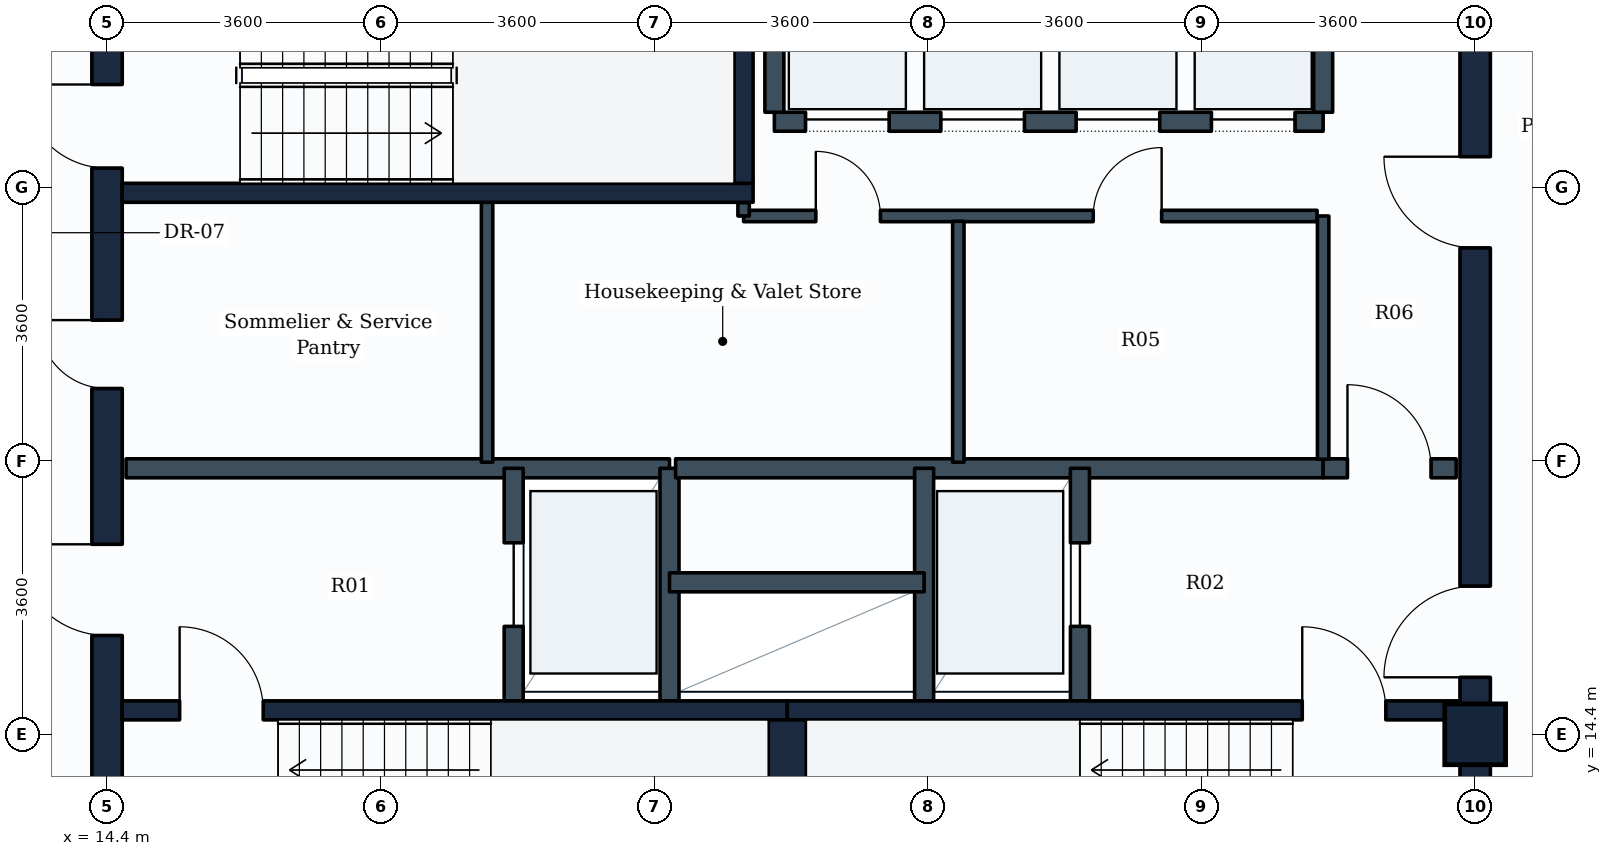
"""IFC4 building model, lengths in metres.
Left out: names, types, materials, properties, quantities, classifications, styles, units other than length and angle.
Written with IfcOpenShell. Run it as: python <this file> out.ifc"""

import sys

from ifc_helpers import new_model, si_unit, direction, frame, frame_2d, origin, origin_2d, place, context, subcontext, project, spatial, rectangle, extrude, element, fill, save


model = new_model("IFC4")
c1 = context("Model", 3, precision=1e-05, world=origin(), true_north=direction((0.0, 1.0)))
c2 = subcontext(c1, "Body", "Model", "MODEL_VIEW")
j1 = project(units=[si_unit("LENGTHUNIT", "METRE"), si_unit("PLANEANGLEUNIT", "RADIAN")], contexts=[c1])
p1 = place(None, origin())
s1 = spatial("IfcSite", under=j1, at=p1, CompositionType="ELEMENT")
p2 = place(p1, origin())
s2 = spatial("IfcBuilding", under=s1, at=p2, CompositionType="ELEMENT")
p3 = place(p2, frame((0.0, 0.0, 242.6)))
s3 = spatial("IfcBuildingStorey", under=s2, at=p3, CompositionType="ELEMENT", Elevation=242.6)
p4 = place(p3, frame((32.4, 14.4, 0.0), z_axis=(0.0, 0.0, 1.0), x_axis=(1.0, 0.0, 0.0)))
e1 = element("IfcColumn", 1, at=p4, inside=s3, PredefinedType="COLUMN", context=c2, shape_type="SweptSolid", body=[
    extrude(rectangle(XDim=0.8, YDim=0.8, at=origin_2d()), origin(), (0.0, 0.0, 1.0), 3.6),
])
p5 = place(p3, frame((14.4, 10.8, 0.0), z_axis=(0.0, 0.0, 1.0), x_axis=(0.0, 1.0, 0.0)))
e2 = element("IfcWall", 2, at=p5, inside=s3, PredefinedType="SHEAR", context=c2, shape_type="SweptSolid", body=[
    extrude(rectangle(XDim=14.4, YDim=0.4, at=frame_2d((7.2, 0.0))), origin(), (0.0, 0.0, 1.0), 3.35),
])
p6 = place(p5, frame((11.05, 0.0, 0.0)))
e3 = element("IfcOpeningElement", 3, at=p6, cuts=e2, PredefinedType="OPENING", context=c2, shape_type="SweptSolid", body=[
    extrude(rectangle(XDim=1.1, YDim=2.1, at=frame_2d((0.55, 1.05))), frame((0.0, 0.21, 0.0), z_axis=(0.0, -1.0, 0.0), x_axis=(1.0, 0.0, 0.0)), (0.0, 0.0, 1.0), 0.42),
])
p7 = place(p5, frame((4.9, 0.0, 0.0)))
e4 = element("IfcOpeningElement", 4, at=p7, cuts=e2, PredefinedType="OPENING", context=c2, shape_type="SweptSolid", body=[
    extrude(rectangle(XDim=1.2, YDim=2.1, at=frame_2d((0.6, 1.05))), frame((0.0, 0.21, 0.0), z_axis=(0.0, -1.0, 0.0), x_axis=(1.0, 0.0, 0.0)), (0.0, 0.0, 1.0), 0.42),
])
p8 = place(p5, frame((8.15, 0.0, 0.0)))
e5 = element("IfcOpeningElement", 5, at=p8, cuts=e2, PredefinedType="OPENING", context=c2, shape_type="SweptSolid", body=[
    extrude(rectangle(XDim=0.9, YDim=2.1, at=frame_2d((0.45, 1.05))), frame((0.0, 0.21, 0.0), z_axis=(0.0, -1.0, 0.0), x_axis=(1.0, 0.0, 0.0)), (0.0, 0.0, 1.0), 0.42),
])
p9 = place(p3, frame((32.4, 10.8, 0.0), z_axis=(0.0, 0.0, 1.0), x_axis=(0.0, 1.0, 0.0)))
e6 = element("IfcWall", 6, at=p9, inside=s3, PredefinedType="SHEAR", context=c2, shape_type="SweptSolid", body=[
    extrude(rectangle(XDim=14.4, YDim=0.4, at=frame_2d((7.2, 0.0))), origin(), (0.0, 0.0, 1.0), 3.35),
])
p10 = place(p9, frame((4.35, 0.0, 0.0)))
e7 = element("IfcOpeningElement", 7, at=p10, cuts=e6, PredefinedType="OPENING", context=c2, shape_type="SweptSolid", body=[
    extrude(rectangle(XDim=1.2, YDim=2.1, at=frame_2d((0.6, 1.05))), frame((0.0, 0.21, 0.0), z_axis=(0.0, -1.0, 0.0), x_axis=(1.0, 0.0, 0.0)), (0.0, 0.0, 1.0), 0.42),
])
p11 = place(p9, frame((10.0, 0.0, 0.0)))
e8 = element("IfcOpeningElement", 8, at=p11, cuts=e6, PredefinedType="OPENING", context=c2, shape_type="SweptSolid", body=[
    extrude(rectangle(XDim=1.2, YDim=2.1, at=frame_2d((0.6, 1.05))), frame((0.0, 0.21, 0.0), z_axis=(0.0, -1.0, 0.0), x_axis=(1.0, 0.0, 0.0)), (0.0, 0.0, 1.0), 0.42),
])
p12 = place(p3, frame((14.6, 14.715, 0.0), z_axis=(0.0, 0.0, 1.0), x_axis=(1.0, 0.0, 0.0)))
e9 = element("IfcWall", 9, at=p12, inside=s3, PredefinedType="SHEAR", context=c2, shape_type="SweptSolid", body=[
    extrude(rectangle(XDim=8.75, YDim=0.25, at=frame_2d((4.375, 0.0))), origin(), (0.0, 0.0, 1.0), 3.35),
])
p13 = place(p12, frame((0.755, 0.0, 0.0)))
e10 = element("IfcOpeningElement", 10, at=p13, cuts=e9, PredefinedType="OPENING", context=c2, shape_type="SweptSolid", body=[
    extrude(rectangle(XDim=1.1, YDim=2.1, at=frame_2d((0.55, 1.05))), frame((0.0, 0.135, 0.0), z_axis=(0.0, -1.0, 0.0), x_axis=(1.0, 0.0, 0.0)), (0.0, 0.0, 1.0), 0.27),
])
p14 = place(p3, frame((23.35, 14.715, 0.0), z_axis=(0.0, 0.0, 1.0), x_axis=(1.0, 0.0, 0.0)))
e11 = element("IfcWall", 11, at=p14, inside=s3, PredefinedType="SHEAR", context=c2, shape_type="SweptSolid", body=[
    extrude(rectangle(XDim=8.85, YDim=0.25, at=frame_2d((4.425, 0.0))), origin(), (0.0, 0.0, 1.0), 3.35),
])
p15 = place(p14, frame((6.775, 0.0, 0.0)))
e12 = element("IfcOpeningElement", 12, at=p15, cuts=e11, PredefinedType="OPENING", context=c2, shape_type="SweptSolid", body=[
    extrude(rectangle(XDim=1.1, YDim=2.1, at=frame_2d((0.55, 1.05))), frame((0.0, 0.135, 0.0), z_axis=(0.0, -1.0, 0.0), x_axis=(1.0, 0.0, 0.0)), (0.0, 0.0, 1.0), 0.27),
])
p16 = place(p3, frame((23.35, 11.75, 0.0), z_axis=(0.0, 0.0, 1.0), x_axis=(0.0, 1.0, 0.0)))
e13 = element("IfcWall", 13, at=p16, inside=s3, PredefinedType="SHEAR", context=c2, shape_type="SweptSolid", body=[
    extrude(rectangle(XDim=2.84, YDim=0.5, at=frame_2d((1.42, 0.0))), origin(), (0.0, 0.0, 1.0), 3.35),
])
p17 = place(p3, frame((14.6, 21.525, 0.0), z_axis=(0.0, 0.0, 1.0), x_axis=(1.0, 0.0, 0.0)))
e14 = element("IfcWall", 14, at=p17, inside=s3, PredefinedType="SHEAR", context=c2, shape_type="SweptSolid", body=[
    extrude(rectangle(XDim=8.3, YDim=0.25, at=frame_2d((4.15, 0.0))), origin(), (0.0, 0.0, 1.0), 3.35),
])
p18 = place(p3, frame((22.775, 21.65, 0.0), z_axis=(0.0, 0.0, 1.0), x_axis=(0.0, 1.0, 0.0)))
e15 = element("IfcWall", 15, at=p18, inside=s3, PredefinedType="SHEAR", context=c2, shape_type="SweptSolid", body=[
    extrude(rectangle(XDim=2.84, YDim=0.25, at=frame_2d((1.42, 0.0))), origin(), (0.0, 0.0, 1.0), 3.35),
])
p19 = place(p3, frame((14.65, 17.9, 0.0), z_axis=(0.0, 0.0, 1.0), x_axis=(1.0, 0.0, 0.0)))
e16 = element("IfcWall", 16, at=p19, inside=s3, PredefinedType="PARTITIONING", context=c2, shape_type="SweptSolid", body=[
    extrude(rectangle(XDim=7.15, YDim=0.25, at=frame_2d((3.575, 0.0))), origin(), (0.0, 0.0, 1.0), 3.335),
])
p20 = place(p3, frame((19.75, 14.84, 0.0), z_axis=(0.0, 0.0, 1.0), x_axis=(0.0, 1.0, 0.0)))
e17 = element("IfcWall", 17, at=p20, inside=s3, PredefinedType="PARTITIONING", context=c2, shape_type="SweptSolid", body=[
    extrude(rectangle(XDim=3.06, YDim=0.25, at=frame_2d((1.53, 0.0))), origin(), (0.0, 0.0, 1.0), 3.335),
])
p21 = place(p20, frame((0.98, 0.0, 0.0)))
e18 = element("IfcOpeningElement", 18, at=p21, cuts=e17, PredefinedType="OPENING", context=c2, shape_type="SweptSolid", body=[
    extrude(rectangle(XDim=1.1, YDim=2.1, at=frame_2d((0.55, 1.05))), frame((0.0, 0.135, 0.0), z_axis=(0.0, -1.0, 0.0), x_axis=(1.0, 0.0, 0.0)), (0.0, 0.0, 1.0), 0.27),
])
p22 = place(p3, frame((21.8, 14.84, 0.0), z_axis=(0.0, 0.0, 1.0), x_axis=(0.0, 1.0, 0.0)))
e19 = element("IfcWall", 19, at=p22, inside=s3, PredefinedType="PARTITIONING", context=c2, shape_type="SweptSolid", body=[
    extrude(rectangle(XDim=3.06, YDim=0.25, at=frame_2d((1.53, 0.0))), origin(), (0.0, 0.0, 1.0), 3.335),
])
p23 = place(p3, frame((21.88, 17.9, 0.0), z_axis=(0.0, 0.0, 1.0), x_axis=(1.0, 0.0, 0.0)))
e20 = element("IfcWall", 20, at=p23, inside=s3, PredefinedType="PARTITIONING", context=c2, shape_type="SweptSolid", body=[
    extrude(rectangle(XDim=8.52, YDim=0.25, at=frame_2d((4.26, 0.0))), origin(), (0.0, 0.0, 1.0), 3.335),
])
p24 = place(p3, frame((30.4, 17.9, 0.0), z_axis=(0.0, 0.0, 1.0), x_axis=(1.0, 0.0, 0.0)))
e21 = element("IfcWall", 21, at=p24, inside=s3, PredefinedType="PARTITIONING", context=c2, shape_type="SweptSolid", body=[
    extrude(rectangle(XDim=1.75, YDim=0.25, at=frame_2d((0.875, 0.0))), origin(), (0.0, 0.0, 1.0), 3.335),
])
p25 = place(p24, frame((0.32, 0.0, 0.0)))
e22 = element("IfcOpeningElement", 22, at=p25, cuts=e21, PredefinedType="OPENING", context=c2, shape_type="SweptSolid", body=[
    extrude(rectangle(XDim=1.1, YDim=2.1, at=frame_2d((0.55, 1.05))), frame((0.0, 0.135, 0.0), z_axis=(0.0, -1.0, 0.0), x_axis=(1.0, 0.0, 0.0)), (0.0, 0.0, 1.0), 0.27),
])
p26 = place(p3, frame((25.15, 14.84, 0.0), z_axis=(0.0, 0.0, 1.0), x_axis=(0.0, 1.0, 0.0)))
e23 = element("IfcWall", 23, at=p26, inside=s3, PredefinedType="PARTITIONING", context=c2, shape_type="SweptSolid", body=[
    extrude(rectangle(XDim=3.06, YDim=0.25, at=frame_2d((1.53, 0.0))), origin(), (0.0, 0.0, 1.0), 3.335),
])
p27 = place(p3, frame((27.2, 14.84, 0.0), z_axis=(0.0, 0.0, 1.0), x_axis=(0.0, 1.0, 0.0)))
e24 = element("IfcWall", 24, at=p27, inside=s3, PredefinedType="PARTITIONING", context=c2, shape_type="SweptSolid", body=[
    extrude(rectangle(XDim=3.06, YDim=0.25, at=frame_2d((1.53, 0.0))), origin(), (0.0, 0.0, 1.0), 3.335),
])
p28 = place(p27, frame((0.98, 0.0, 0.0)))
e25 = element("IfcOpeningElement", 25, at=p28, cuts=e24, PredefinedType="OPENING", context=c2, shape_type="SweptSolid", body=[
    extrude(rectangle(XDim=1.1, YDim=2.1, at=frame_2d((0.55, 1.05))), frame((0.0, 0.135, 0.0), z_axis=(0.0, -1.0, 0.0), x_axis=(1.0, 0.0, 0.0)), (0.0, 0.0, 1.0), 0.27),
])
p29 = place(p3, frame((21.8, 16.4, 0.0), z_axis=(0.0, 0.0, 1.0), x_axis=(1.0, 0.0, 0.0)))
e26 = element("IfcWall", 26, at=p29, inside=s3, PredefinedType="PARTITIONING", context=c2, shape_type="SweptSolid", body=[
    extrude(rectangle(XDim=3.35, YDim=0.25, at=frame_2d((1.675, 0.0))), origin(), (0.0, 0.0, 1.0), 3.335),
])
p30 = place(p3, frame((23.18, 22.46, 0.0), z_axis=(0.0, 0.0, 1.0), x_axis=(1.0, 0.0, 0.0)))
e27 = element("IfcWall", 27, at=p30, inside=s3, PredefinedType="PARTITIONING", context=c2, shape_type="SweptSolid", body=[
    extrude(rectangle(XDim=7.22, YDim=0.25, at=frame_2d((3.61, 0.0))), origin(), (0.0, 0.0, 1.0), 3.335),
])
p31 = place(p30, frame((0.41, 0.0, 0.0)))
e28 = element("IfcOpeningElement", 28, at=p31, cuts=e27, PredefinedType="OPENING", context=c2, shape_type="SweptSolid", body=[
    extrude(rectangle(XDim=1.1, YDim=2.1, at=frame_2d((0.55, 1.05))), frame((0.0, 0.135, 0.0), z_axis=(0.0, -1.0, 0.0), x_axis=(1.0, 0.0, 0.0)), (0.0, 0.0, 1.0), 0.27),
])
p32 = place(p30, frame((2.19, 0.0, 0.0)))
e29 = element("IfcOpeningElement", 29, at=p32, cuts=e27, PredefinedType="OPENING", context=c2, shape_type="SweptSolid", body=[
    extrude(rectangle(XDim=1.1, YDim=2.1, at=frame_2d((0.55, 1.05))), frame((0.0, 0.135, 0.0), z_axis=(0.0, -1.0, 0.0), x_axis=(1.0, 0.0, 0.0)), (0.0, 0.0, 1.0), 0.27),
])
p33 = place(p30, frame((3.97, 0.0, 0.0)))
e30 = element("IfcOpeningElement", 30, at=p33, cuts=e27, PredefinedType="OPENING", context=c2, shape_type="SweptSolid", body=[
    extrude(rectangle(XDim=1.1, YDim=2.1, at=frame_2d((0.55, 1.05))), frame((0.0, 0.135, 0.0), z_axis=(0.0, -1.0, 0.0), x_axis=(1.0, 0.0, 0.0)), (0.0, 0.0, 1.0), 0.27),
])
p34 = place(p30, frame((5.75, 0.0, 0.0)))
e31 = element("IfcOpeningElement", 31, at=p34, cuts=e27, PredefinedType="OPENING", context=c2, shape_type="SweptSolid", body=[
    extrude(rectangle(XDim=1.1, YDim=2.1, at=frame_2d((0.55, 1.05))), frame((0.0, 0.135, 0.0), z_axis=(0.0, -1.0, 0.0), x_axis=(1.0, 0.0, 0.0)), (0.0, 0.0, 1.0), 0.27),
])
for number, where, z_axis, x_axis in (
    (32, (23.18, 22.585, 0.0), (0.0, 0.0, 1.0), (0.0, 1.0, 0.0)),
    (33, (30.4, 22.585, 0.0), (0.0, 0.0, 1.0), (0.0, 1.0, 0.0)),
):
    element("IfcWall", number, at=place(p3, frame(where, z_axis=z_axis, x_axis=x_axis)), inside=s3, PredefinedType="PARTITIONING", context=c2, shape_type="SweptSolid", body=[
        extrude(rectangle(XDim=2.315, YDim=0.25, at=frame_2d((1.157, 0.0))), origin(), (0.0, 0.0, 1.0), 3.335),
    ])
p35 = place(p3, frame((22.775, 21.22, 0.0), z_axis=(0.0, 0.0, 1.0), x_axis=(1.0, 0.0, 0.0)))
e34 = element("IfcWall", 34, at=p35, inside=s3, PredefinedType="PARTITIONING", context=c2, shape_type="SweptSolid", body=[
    extrude(rectangle(XDim=7.545, YDim=0.15, at=frame_2d((3.772, 0.0))), origin(), (0.0, 0.0, 1.0), 3.335),
])
p36 = place(p35, frame((0.95, 0.0, 0.0)))
e35 = element("IfcOpeningElement", 35, at=p36, cuts=e34, PredefinedType="OPENING", context=c2, shape_type="SweptSolid", body=[
    extrude(rectangle(XDim=0.85, YDim=2.1, at=frame_2d((0.425, 1.05))), frame((0.0, 0.085, 0.0), z_axis=(0.0, -1.0, 0.0), x_axis=(1.0, 0.0, 0.0)), (0.0, 0.0, 1.0), 0.17),
])
p37 = place(p35, frame((4.6, 0.0, 0.0)))
e36 = element("IfcOpeningElement", 36, at=p37, cuts=e34, PredefinedType="OPENING", context=c2, shape_type="SweptSolid", body=[
    extrude(rectangle(XDim=0.9, YDim=2.1, at=frame_2d((0.45, 1.05))), frame((0.0, 0.085, 0.0), z_axis=(0.0, -1.0, 0.0), x_axis=(1.0, 0.0, 0.0)), (0.0, 0.0, 1.0), 0.17),
])
p38 = place(p3, frame((22.775, 21.22, 0.0), z_axis=(0.0, 0.0, 1.0), x_axis=(0.0, 1.0, 0.0)))
e37 = element("IfcWall", 37, at=p38, inside=s3, PredefinedType="PARTITIONING", context=c2, shape_type="SweptSolid", body=[
    extrude(rectangle(XDim=0.175, YDim=0.15, at=frame_2d((0.087, 0.0))), origin(), (0.0, 0.0, 1.0), 3.335),
])
p39 = place(p3, frame((30.4, 18.02, 0.0), z_axis=(0.0, 0.0, 1.0), x_axis=(0.0, 1.0, 0.0)))
e38 = element("IfcWall", 38, at=p39, inside=s3, PredefinedType="PARTITIONING", context=c2, shape_type="SweptSolid", body=[
    extrude(rectangle(XDim=3.2, YDim=0.15, at=frame_2d((1.6, 0.0))), origin(), (0.0, 0.0, 1.0), 3.335),
])
p40 = place(p3, frame((19.4, 17.98, 0.0), z_axis=(0.0, 0.0, 1.0), x_axis=(0.0, 1.0, 0.0)))
e39 = element("IfcWall", 39, at=p40, inside=s3, PredefinedType="PARTITIONING", context=c2, shape_type="SweptSolid", body=[
    extrude(rectangle(XDim=3.42, YDim=0.15, at=frame_2d((1.71, 0.0))), origin(), (0.0, 0.0, 1.0), 3.335),
])
p41 = place(p3, frame((25.6, 17.98, 0.0), z_axis=(0.0, 0.0, 1.0), x_axis=(0.0, 1.0, 0.0)))
e40 = element("IfcWall", 40, at=p41, inside=s3, PredefinedType="PARTITIONING", context=c2, shape_type="SweptSolid", body=[
    extrude(rectangle(XDim=3.17, YDim=0.15, at=frame_2d((1.585, 0.0))), origin(), (0.0, 0.0, 1.0), 3.335),
])
p42 = place(p13, origin())
e41 = element("IfcDoor", 41, at=p42, inside=s3, OperationType="SINGLE_SWING_LEFT", PredefinedType="DOOR", context=c2, shape_type="SweptSolid", body=[
    extrude(rectangle(XDim=1.1, YDim=2.1, at=frame_2d((0.55, 1.05))), frame((0.0, 0.025, 0.0), z_axis=(0.0, -1.0, 0.0), x_axis=(1.0, 0.0, 0.0)), (0.0, 0.0, 1.0), 0.05),
])
fill(e10, e41)
p43 = place(p15, origin())
e42 = element("IfcDoor", 42, at=p43, inside=s3, OperationType="SINGLE_SWING_LEFT", PredefinedType="DOOR", context=c2, shape_type="SweptSolid", body=[
    extrude(rectangle(XDim=1.1, YDim=2.1, at=frame_2d((0.55, 1.05))), frame((0.0, 0.025, 0.0), z_axis=(0.0, -1.0, 0.0), x_axis=(1.0, 0.0, 0.0)), (0.0, 0.0, 1.0), 0.05),
])
fill(e12, e42)
p44 = place(p6, origin())
e43 = element("IfcDoor", 43, at=p44, inside=s3, OperationType="SINGLE_SWING_RIGHT", PredefinedType="DOOR", context=c2, shape_type="SweptSolid", body=[
    extrude(rectangle(XDim=1.1, YDim=2.1, at=frame_2d((0.55, 1.05))), frame((0.0, 0.025, 0.0), z_axis=(0.0, -1.0, 0.0), x_axis=(1.0, 0.0, 0.0)), (0.0, 0.0, 1.0), 0.05),
])
fill(e3, e43)
p45 = place(p21, origin())
e44 = element("IfcDoor", 44, at=p45, inside=s3, OperationType="SLIDING_TO_LEFT", PredefinedType="DOOR", context=c2, shape_type="SweptSolid", body=[
    extrude(rectangle(XDim=1.1, YDim=2.1, at=frame_2d((0.55, 1.05))), frame((0.0, 0.025, 0.0), z_axis=(0.0, -1.0, 0.0), x_axis=(1.0, 0.0, 0.0)), (0.0, 0.0, 1.0), 0.05),
])
fill(e18, e44)
p46 = place(p28, origin())
e45 = element("IfcDoor", 45, at=p46, inside=s3, OperationType="SLIDING_TO_LEFT", PredefinedType="DOOR", context=c2, shape_type="SweptSolid", body=[
    extrude(rectangle(XDim=1.1, YDim=2.1, at=frame_2d((0.55, 1.05))), frame((0.0, 0.025, 0.0), z_axis=(0.0, -1.0, 0.0), x_axis=(1.0, 0.0, 0.0)), (0.0, 0.0, 1.0), 0.05),
])
fill(e25, e45)
p47 = place(p7, origin())
e46 = element("IfcDoor", 46, at=p47, inside=s3, OperationType="SINGLE_SWING_RIGHT", PredefinedType="DOOR", context=c2, shape_type="SweptSolid", body=[
    extrude(rectangle(XDim=1.2, YDim=2.1, at=frame_2d((0.6, 1.05))), frame((0.0, 0.025, 0.0), z_axis=(0.0, -1.0, 0.0), x_axis=(1.0, 0.0, 0.0)), (0.0, 0.0, 1.0), 0.05),
])
fill(e4, e46)
p48 = place(p10, origin())
e47 = element("IfcDoor", 47, at=p48, inside=s3, OperationType="SINGLE_SWING_LEFT", PredefinedType="DOOR", context=c2, shape_type="SweptSolid", body=[
    extrude(rectangle(XDim=1.2, YDim=2.1, at=frame_2d((0.6, 1.05))), frame((0.0, 0.025, 0.0), z_axis=(0.0, -1.0, 0.0), x_axis=(1.0, 0.0, 0.0)), (0.0, 0.0, 1.0), 0.05),
])
fill(e7, e47)
p49 = place(p25, origin())
e48 = element("IfcDoor", 48, at=p49, inside=s3, OperationType="SINGLE_SWING_LEFT", PredefinedType="DOOR", context=c2, shape_type="SweptSolid", body=[
    extrude(rectangle(XDim=1.1, YDim=2.1, at=frame_2d((0.55, 1.05))), frame((0.0, 0.025, 0.0), z_axis=(0.0, -1.0, 0.0), x_axis=(1.0, 0.0, 0.0)), (0.0, 0.0, 1.0), 0.05),
])
fill(e22, e48)
p50 = place(p31, origin())
e49 = element("IfcDoor", 49, at=p50, inside=s3, OperationType="SLIDING_TO_LEFT", PredefinedType="DOOR", context=c2, shape_type="SweptSolid", body=[
    extrude(rectangle(XDim=1.1, YDim=2.1, at=frame_2d((0.55, 1.05))), frame((0.0, 0.025, 0.0), z_axis=(0.0, -1.0, 0.0), x_axis=(1.0, 0.0, 0.0)), (0.0, 0.0, 1.0), 0.05),
])
fill(e28, e49)
p51 = place(p32, origin())
e50 = element("IfcDoor", 50, at=p51, inside=s3, OperationType="SLIDING_TO_LEFT", PredefinedType="DOOR", context=c2, shape_type="SweptSolid", body=[
    extrude(rectangle(XDim=1.1, YDim=2.1, at=frame_2d((0.55, 1.05))), frame((0.0, 0.025, 0.0), z_axis=(0.0, -1.0, 0.0), x_axis=(1.0, 0.0, 0.0)), (0.0, 0.0, 1.0), 0.05),
])
fill(e29, e50)
p52 = place(p33, origin())
e51 = element("IfcDoor", 51, at=p52, inside=s3, OperationType="SLIDING_TO_LEFT", PredefinedType="DOOR", context=c2, shape_type="SweptSolid", body=[
    extrude(rectangle(XDim=1.1, YDim=2.1, at=frame_2d((0.55, 1.05))), frame((0.0, 0.025, 0.0), z_axis=(0.0, -1.0, 0.0), x_axis=(1.0, 0.0, 0.0)), (0.0, 0.0, 1.0), 0.05),
])
fill(e30, e51)
p53 = place(p34, origin())
e52 = element("IfcDoor", 52, at=p53, inside=s3, OperationType="SLIDING_TO_LEFT", PredefinedType="DOOR", context=c2, shape_type="SweptSolid", body=[
    extrude(rectangle(XDim=1.1, YDim=2.1, at=frame_2d((0.55, 1.05))), frame((0.0, 0.025, 0.0), z_axis=(0.0, -1.0, 0.0), x_axis=(1.0, 0.0, 0.0)), (0.0, 0.0, 1.0), 0.05),
])
fill(e31, e52)
p54 = place(p11, origin())
e53 = element("IfcDoor", 53, at=p54, inside=s3, OperationType="SINGLE_SWING_RIGHT", PredefinedType="DOOR", context=c2, shape_type="SweptSolid", body=[
    extrude(rectangle(XDim=1.2, YDim=2.1, at=frame_2d((0.6, 1.05))), frame((0.0, 0.025, 0.0), z_axis=(0.0, -1.0, 0.0), x_axis=(1.0, 0.0, 0.0)), (0.0, 0.0, 1.0), 0.05),
])
fill(e8, e53)
p55 = place(p8, origin())
e54 = element("IfcDoor", 54, at=p55, inside=s3, OperationType="SINGLE_SWING_RIGHT", PredefinedType="DOOR", context=c2, shape_type="SweptSolid", body=[
    extrude(rectangle(XDim=0.9, YDim=2.1, at=frame_2d((0.45, 1.05))), frame((0.0, 0.025, 0.0), z_axis=(0.0, -1.0, 0.0), x_axis=(1.0, 0.0, 0.0)), (0.0, 0.0, 1.0), 0.05),
])
fill(e5, e54)
p56 = place(p36, origin())
e55 = element("IfcDoor", 55, at=p56, inside=s3, OperationType="SINGLE_SWING_LEFT", PredefinedType="DOOR", context=c2, shape_type="SweptSolid", body=[
    extrude(rectangle(XDim=0.85, YDim=2.1, at=frame_2d((0.425, 1.05))), frame((0.0, 0.025, 0.0), z_axis=(0.0, -1.0, 0.0), x_axis=(1.0, 0.0, 0.0)), (0.0, 0.0, 1.0), 0.05),
])
fill(e35, e55)
p57 = place(p37, origin())
e56 = element("IfcDoor", 56, at=p57, inside=s3, OperationType="SINGLE_SWING_RIGHT", PredefinedType="DOOR", context=c2, shape_type="SweptSolid", body=[
    extrude(rectangle(XDim=0.9, YDim=2.1, at=frame_2d((0.45, 1.05))), frame((0.0, 0.025, 0.0), z_axis=(0.0, -1.0, 0.0), x_axis=(1.0, 0.0, 0.0)), (0.0, 0.0, 1.0), 0.05),
])
fill(e36, e56)
save(model, sys.argv[1])
